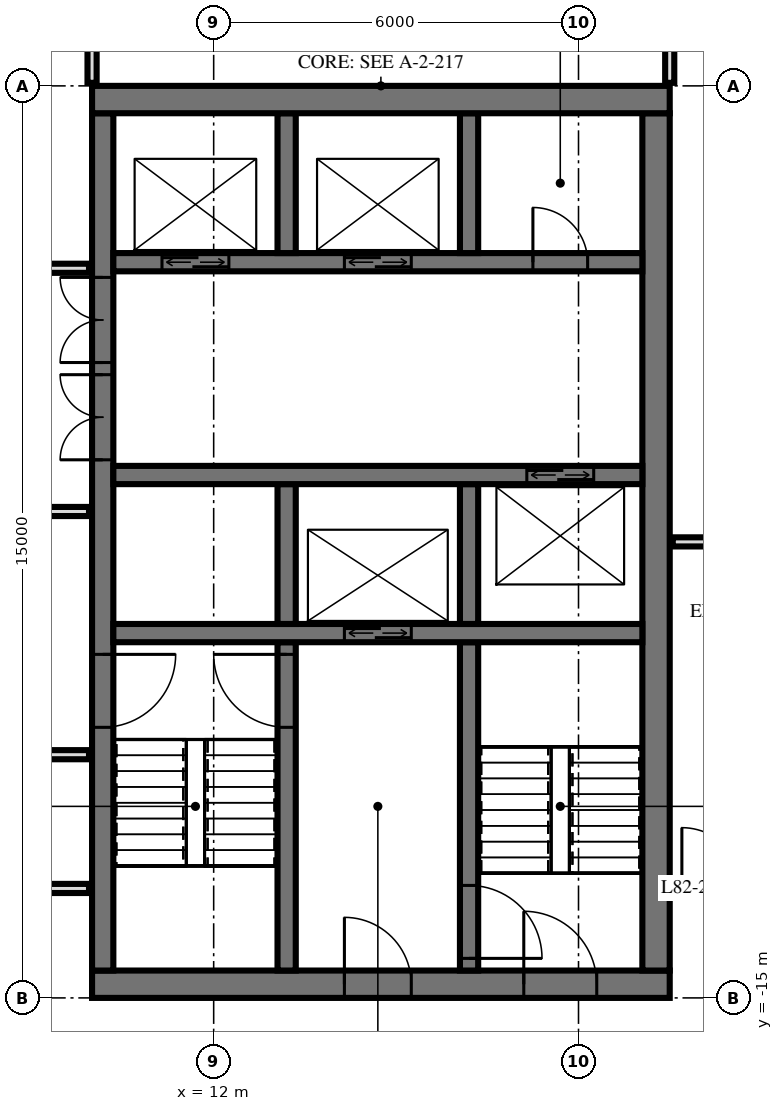
"""IFC4 building model, lengths in metres.
Left out: names, types, materials, properties, quantities, classifications, styles, units other than length and angle.
Written with IfcOpenShell. Run it as: python <this file> out.ifc"""

import sys

from ifc_helpers import new_model, si_unit, direction, frame, frame_2d, origin, place, context, subcontext, project, spatial, rectangle, extrude, element, fill, save


model = new_model("IFC4")
c1 = context("Model", 3, precision=1e-05, world=origin(), true_north=direction((0.0, 1.0)))
c2 = subcontext(c1, "Body", "Model", "MODEL_VIEW")
j1 = project(units=[si_unit("LENGTHUNIT", "METRE"), si_unit("PLANEANGLEUNIT", "RADIAN")], contexts=[c1])
p1 = place(None, origin())
s1 = spatial("IfcSite", under=j1, at=p1, CompositionType="ELEMENT")
p2 = place(p1, origin())
s2 = spatial("IfcBuilding", under=s1, at=p2, CompositionType="ELEMENT")
p3 = place(p2, frame((0.0, 0.0, 308.6)))
s3 = spatial("IfcBuildingStorey", under=s2, at=p3, CompositionType="ELEMENT", Elevation=308.6)
p4 = place(p3, frame((10.0, -0.225, 0.0), z_axis=(0.0, 0.0, 1.0), x_axis=(1.0, 0.0, 0.0)))
e1 = element("IfcWall", 1, at=p4, inside=s3, PredefinedType="SHEAR", context=c2, shape_type="SweptSolid", body=[
    extrude(rectangle(XDim=9.5, YDim=0.45, at=frame_2d((4.75, 0.0))), origin(), (0.0, 0.0, 1.0), 6.0),
])
p5 = place(p3, frame((10.0, -14.775, 0.0), z_axis=(0.0, 0.0, 1.0), x_axis=(1.0, 0.0, 0.0)))
e2 = element("IfcWall", 2, at=p5, inside=s3, PredefinedType="SHEAR", context=c2, shape_type="SweptSolid", body=[
    extrude(rectangle(XDim=9.5, YDim=0.45, at=frame_2d((4.75, 0.0))), origin(), (0.0, 0.0, 1.0), 6.0),
])
p6 = place(p5, frame((7.1, 0.0, 0.0)))
e3 = element("IfcOpeningElement", 3, at=p6, cuts=e2, PredefinedType="OPENING", context=c2, shape_type="SweptSolid", body=[
    extrude(rectangle(XDim=1.2, YDim=2.1, at=frame_2d((0.6, 1.05))), frame((0.0, 0.235, 0.0), z_axis=(0.0, -1.0, 0.0), x_axis=(1.0, 0.0, 0.0)), (0.0, 0.0, 1.0), 0.47),
])
p7 = place(p5, frame((4.15, 0.0, 0.0)))
e4 = element("IfcOpeningElement", 4, at=p7, cuts=e2, PredefinedType="OPENING", context=c2, shape_type="SweptSolid", body=[
    extrude(rectangle(XDim=1.1, YDim=2.1, at=frame_2d((0.55, 1.05))), frame((0.0, 0.235, 0.0), z_axis=(0.0, -1.0, 0.0), x_axis=(1.0, 0.0, 0.0)), (0.0, 0.0, 1.0), 0.47),
])
p8 = place(p3, frame((10.175, -14.55, 0.0), z_axis=(0.0, 0.0, 1.0), x_axis=(0.0, 1.0, 0.0)))
e5 = element("IfcWall", 5, at=p8, inside=s3, PredefinedType="SHEAR", context=c2, shape_type="SweptSolid", body=[
    extrude(rectangle(XDim=14.1, YDim=0.35, at=frame_2d((7.05, 0.0))), origin(), (0.0, 0.0, 1.0), 6.0),
])
p9 = place(p8, frame((8.4, 0.0, 0.0)))
e6 = element("IfcOpeningElement", 6, at=p9, cuts=e5, PredefinedType="OPENING", context=c2, shape_type="SweptSolid", body=[
    extrude(rectangle(XDim=1.4, YDim=2.4, at=frame_2d((0.7, 1.2))), frame((0.0, 0.185, 0.0), z_axis=(0.0, -1.0, 0.0), x_axis=(1.0, 0.0, 0.0)), (0.0, 0.0, 1.0), 0.37),
])
p10 = place(p8, frame((10.0, 0.0, 0.0)))
e7 = element("IfcOpeningElement", 7, at=p10, cuts=e5, PredefinedType="OPENING", context=c2, shape_type="SweptSolid", body=[
    extrude(rectangle(XDim=1.4, YDim=2.4, at=frame_2d((0.7, 1.2))), frame((0.0, 0.185, 0.0), z_axis=(0.0, -1.0, 0.0), x_axis=(1.0, 0.0, 0.0)), (0.0, 0.0, 1.0), 0.37),
])
p11 = place(p8, frame((4.0, 0.0, 0.0)))
e8 = element("IfcOpeningElement", 8, at=p11, cuts=e5, PredefinedType="OPENING", context=c2, shape_type="SweptSolid", body=[
    extrude(rectangle(XDim=1.2, YDim=2.1, at=frame_2d((0.6, 1.05))), frame((0.0, 0.185, 0.0), z_axis=(0.0, -1.0, 0.0), x_axis=(1.0, 0.0, 0.0)), (0.0, 0.0, 1.0), 0.37),
])
p12 = place(p3, frame((19.275, -14.55, 0.0), z_axis=(0.0, 0.0, 1.0), x_axis=(0.0, 1.0, 0.0)))
e9 = element("IfcWall", 9, at=p12, inside=s3, PredefinedType="SHEAR", context=c2, shape_type="SweptSolid", body=[
    extrude(rectangle(XDim=14.1, YDim=0.45, at=frame_2d((7.05, 0.0))), origin(), (0.0, 0.0, 1.0), 6.0),
])
p13 = place(p3, frame((10.35, -2.9, 0.0), z_axis=(0.0, 0.0, 1.0), x_axis=(1.0, 0.0, 0.0)))
e10 = element("IfcWall", 10, at=p13, inside=s3, PredefinedType="SHEAR", context=c2, shape_type="SweptSolid", body=[
    extrude(rectangle(XDim=8.7, YDim=0.3, at=frame_2d((4.35, 0.0))), origin(), (0.0, 0.0, 1.0), 6.0),
])
p14 = place(p13, frame((0.8, 0.0, 0.0)))
e11 = element("IfcOpeningElement", 11, at=p14, cuts=e10, PredefinedType="OPENING", context=c2, shape_type="SweptSolid", body=[
    extrude(rectangle(XDim=1.1, YDim=2.1, at=frame_2d((0.55, 1.05))), frame((0.0, 0.16, 0.0), z_axis=(0.0, -1.0, 0.0), x_axis=(1.0, 0.0, 0.0)), (0.0, 0.0, 1.0), 0.32),
])
p15 = place(p13, frame((3.8, 0.0, 0.0)))
e12 = element("IfcOpeningElement", 12, at=p15, cuts=e10, PredefinedType="OPENING", context=c2, shape_type="SweptSolid", body=[
    extrude(rectangle(XDim=1.1, YDim=2.1, at=frame_2d((0.55, 1.05))), frame((0.0, 0.16, 0.0), z_axis=(0.0, -1.0, 0.0), x_axis=(1.0, 0.0, 0.0)), (0.0, 0.0, 1.0), 0.32),
])
p16 = place(p13, frame((6.9, 0.0, 0.0)))
e13 = element("IfcOpeningElement", 13, at=p16, cuts=e10, PredefinedType="OPENING", context=c2, shape_type="SweptSolid", body=[
    extrude(rectangle(XDim=0.9, YDim=2.1, at=frame_2d((0.45, 1.05))), frame((0.0, 0.16, 0.0), z_axis=(0.0, -1.0, 0.0), x_axis=(1.0, 0.0, 0.0)), (0.0, 0.0, 1.0), 0.32),
])
p17 = place(p3, frame((10.35, -6.4, 0.0), z_axis=(0.0, 0.0, 1.0), x_axis=(1.0, 0.0, 0.0)))
e14 = element("IfcWall", 14, at=p17, inside=s3, PredefinedType="SHEAR", context=c2, shape_type="SweptSolid", body=[
    extrude(rectangle(XDim=8.7, YDim=0.3, at=frame_2d((4.35, 0.0))), origin(), (0.0, 0.0, 1.0), 6.0),
])
p18 = place(p17, frame((6.8, 0.0, 0.0)))
e15 = element("IfcOpeningElement", 15, at=p18, cuts=e14, PredefinedType="OPENING", context=c2, shape_type="SweptSolid", body=[
    extrude(rectangle(XDim=1.1, YDim=2.1, at=frame_2d((0.55, 1.05))), frame((0.0, 0.16, 0.0), z_axis=(0.0, -1.0, 0.0), x_axis=(1.0, 0.0, 0.0)), (0.0, 0.0, 1.0), 0.32),
])
p19 = place(p3, frame((10.35, -9.0, 0.0), z_axis=(0.0, 0.0, 1.0), x_axis=(1.0, 0.0, 0.0)))
e16 = element("IfcWall", 16, at=p19, inside=s3, PredefinedType="SHEAR", context=c2, shape_type="SweptSolid", body=[
    extrude(rectangle(XDim=8.7, YDim=0.3, at=frame_2d((4.35, 0.0))), origin(), (0.0, 0.0, 1.0), 6.0),
])
p20 = place(p19, frame((3.8, 0.0, 0.0)))
e17 = element("IfcOpeningElement", 17, at=p20, cuts=e16, PredefinedType="OPENING", context=c2, shape_type="SweptSolid", body=[
    extrude(rectangle(XDim=1.1, YDim=2.1, at=frame_2d((0.55, 1.05))), frame((0.0, 0.16, 0.0), z_axis=(0.0, -1.0, 0.0), x_axis=(1.0, 0.0, 0.0)), (0.0, 0.0, 1.0), 0.32),
])
for number, where, z_axis, x_axis in (
    (18, (13.2, -2.75, 0.0), (0.0, 0.0, 1.0), (0.0, 1.0, 0.0)),
    (19, (13.2, -8.85, 0.0), (0.0, 0.0, 1.0), (0.0, 1.0, 0.0)),
):
    element("IfcWall", number, at=place(p3, frame(where, z_axis=z_axis, x_axis=x_axis)), inside=s3, PredefinedType="SHEAR", context=c2, shape_type="SweptSolid", body=[
        extrude(rectangle(XDim=2.3, YDim=0.3, at=frame_2d((1.15, 0.0))), origin(), (0.0, 0.0, 1.0), 6.0),
    ])
p21 = place(p3, frame((13.2, -14.55, 0.0), z_axis=(0.0, 0.0, 1.0), x_axis=(0.0, 1.0, 0.0)))
e20 = element("IfcWall", 20, at=p21, inside=s3, PredefinedType="SHEAR", context=c2, shape_type="SweptSolid", body=[
    extrude(rectangle(XDim=5.4, YDim=0.3, at=frame_2d((2.7, 0.0))), origin(), (0.0, 0.0, 1.0), 6.0),
])
p22 = place(p21, frame((4.0, 0.0, 0.0)))
e21 = element("IfcOpeningElement", 21, at=p22, cuts=e20, PredefinedType="OPENING", context=c2, shape_type="SweptSolid", body=[
    extrude(rectangle(XDim=1.2, YDim=2.1, at=frame_2d((0.6, 1.05))), frame((0.0, 0.16, 0.0), z_axis=(0.0, -1.0, 0.0), x_axis=(1.0, 0.0, 0.0)), (0.0, 0.0, 1.0), 0.32),
])
for number, where, z_axis, x_axis in (
    (22, (16.2, -2.75, 0.0), (0.0, 0.0, 1.0), (0.0, 1.0, 0.0)),
    (23, (16.2, -8.85, 0.0), (0.0, 0.0, 1.0), (0.0, 1.0, 0.0)),
):
    element("IfcWall", number, at=place(p3, frame(where, z_axis=z_axis, x_axis=x_axis)), inside=s3, PredefinedType="SHEAR", context=c2, shape_type="SweptSolid", body=[
        extrude(rectangle(XDim=2.3, YDim=0.3, at=frame_2d((1.15, 0.0))), origin(), (0.0, 0.0, 1.0), 6.0),
    ])
p23 = place(p3, frame((16.2, -14.55, 0.0), z_axis=(0.0, 0.0, 1.0), x_axis=(0.0, 1.0, 0.0)))
e24 = element("IfcWall", 24, at=p23, inside=s3, PredefinedType="SHEAR", context=c2, shape_type="SweptSolid", body=[
    extrude(rectangle(XDim=5.4, YDim=0.3, at=frame_2d((2.7, 0.0))), origin(), (0.0, 0.0, 1.0), 6.0),
])
p24 = place(p23, frame((0.2, 0.0, 0.0)))
e25 = element("IfcOpeningElement", 25, at=p24, cuts=e24, PredefinedType="OPENING", context=c2, shape_type="SweptSolid", body=[
    extrude(rectangle(XDim=1.2, YDim=2.1, at=frame_2d((0.6, 1.05))), frame((0.0, 0.16, 0.0), z_axis=(0.0, -1.0, 0.0), x_axis=(1.0, 0.0, 0.0)), (0.0, 0.0, 1.0), 0.32),
])
p25 = place(p3, frame((19.5, 0.05, 0.0), z_axis=(0.0, 0.0, 1.0), x_axis=(0.0, 1.0, 0.0)))
e26 = element("IfcWall", 26, at=p25, inside=s3, PredefinedType="PARTITIONING", context=c2, shape_type="SweptSolid", body=[
    extrude(rectangle(XDim=4.403, YDim=0.15, at=frame_2d((2.202, 0.0))), origin(), (0.0, 0.0, 1.0), 5.7),
])
p26 = place(p3, frame((10.0, 0.05, 0.0), z_axis=(0.0, 0.0, 1.0), x_axis=(0.0, 1.0, 0.0)))
e27 = element("IfcWall", 27, at=p26, inside=s3, PredefinedType="PARTITIONING", context=c2, shape_type="SweptSolid", body=[
    extrude(rectangle(XDim=4.62, YDim=0.15, at=frame_2d((2.31, 0.0))), origin(), (0.0, 0.0, 1.0), 5.7),
])
p27 = place(p3, frame((-9.95, -13.2, 0.0), z_axis=(0.0, 0.0, 1.0), x_axis=(1.0, 0.0, 0.0)))
e28 = element("IfcWall", 28, at=p27, inside=s3, PredefinedType="PARTITIONING", context=c2, shape_type="SweptSolid", body=[
    extrude(rectangle(XDim=19.9, YDim=0.15, at=frame_2d((9.95, 0.0))), origin(), (0.0, 0.0, 1.0), 5.7),
])
p28 = place(p27, frame((7.0, 0.0, 0.0)))
e29 = element("IfcOpeningElement", 29, at=p28, cuts=e28, PredefinedType="OPENING", context=c2, shape_type="SweptSolid", body=[
    extrude(rectangle(XDim=1.0, YDim=2.1, at=frame_2d((0.5, 1.05))), frame((0.0, 0.085, 0.0), z_axis=(0.0, -1.0, 0.0), x_axis=(1.0, 0.0, 0.0)), (0.0, 0.0, 1.0), 0.17),
])
p29 = place(p3, frame((19.55, -13.2, 0.0), z_axis=(0.0, 0.0, 1.0), x_axis=(1.0, 0.0, 0.0)))
e30 = element("IfcWall", 30, at=p29, inside=s3, PredefinedType="PARTITIONING", context=c2, shape_type="SweptSolid", body=[
    extrude(rectangle(XDim=3.187, YDim=0.15, at=frame_2d((1.593, 0.0))), origin(), (0.0, 0.0, 1.0), 5.7),
])
p30 = place(p29, frame((0.15, 0.0, 0.0)))
e31 = element("IfcOpeningElement", 31, at=p30, cuts=e30, PredefinedType="OPENING", context=c2, shape_type="SweptSolid", body=[
    extrude(rectangle(XDim=1.0, YDim=2.1, at=frame_2d((0.5, 1.05))), frame((0.0, 0.085, 0.0), z_axis=(0.0, -1.0, 0.0), x_axis=(1.0, 0.0, 0.0)), (0.0, 0.0, 1.0), 0.17),
])
p31 = place(p3, frame((-9.95, -11.0, 0.0), z_axis=(0.0, 0.0, 1.0), x_axis=(1.0, 0.0, 0.0)))
e32 = element("IfcWall", 32, at=p31, inside=s3, PredefinedType="PARTITIONING", context=c2, shape_type="SweptSolid", body=[
    extrude(rectangle(XDim=19.9, YDim=0.15, at=frame_2d((9.95, 0.0))), origin(), (0.0, 0.0, 1.0), 5.7),
])
p32 = place(p31, frame((9.45, 0.0, 0.0)))
e33 = element("IfcOpeningElement", 33, at=p32, cuts=e32, PredefinedType="OPENING", context=c2, shape_type="SweptSolid", body=[
    extrude(rectangle(XDim=1.0, YDim=2.1, at=frame_2d((0.5, 1.05))), frame((0.0, 0.085, 0.0), z_axis=(0.0, -1.0, 0.0), x_axis=(1.0, 0.0, 0.0)), (0.0, 0.0, 1.0), 0.17),
])
p33 = place(p31, frame((15.45, 0.0, 0.0)))
e34 = element("IfcOpeningElement", 34, at=p33, cuts=e32, PredefinedType="OPENING", context=c2, shape_type="SweptSolid", body=[
    extrude(rectangle(XDim=1.0, YDim=2.1, at=frame_2d((0.5, 1.05))), frame((0.0, 0.085, 0.0), z_axis=(0.0, -1.0, 0.0), x_axis=(1.0, 0.0, 0.0)), (0.0, 0.0, 1.0), 0.17),
])
p34 = place(p3, frame((19.55, -7.5, 0.0), z_axis=(0.0, 0.0, 1.0), x_axis=(1.0, 0.0, 0.0)))
e35 = element("IfcWall", 35, at=p34, inside=s3, PredefinedType="PARTITIONING", context=c2, shape_type="SweptSolid", body=[
    extrude(rectangle(XDim=2.569, YDim=0.15, at=frame_2d((1.285, 0.0))), origin(), (0.0, 0.0, 1.0), 5.7),
])
p35 = place(p34, frame((0.901, 0.0, 0.0)))
e36 = element("IfcOpeningElement", 36, at=p35, cuts=e35, PredefinedType="OPENING", context=c2, shape_type="SweptSolid", body=[
    extrude(rectangle(XDim=0.9, YDim=2.1, at=frame_2d((0.45, 1.05))), frame((0.0, 0.085, 0.0), z_axis=(0.0, -1.0, 0.0), x_axis=(1.0, 0.0, 0.0)), (0.0, 0.0, 1.0), 0.17),
])
p36 = place(p3, frame((-9.95, -7.0, 0.0), z_axis=(0.0, 0.0, 1.0), x_axis=(1.0, 0.0, 0.0)))
e37 = element("IfcWall", 37, at=p36, inside=s3, PredefinedType="PARTITIONING", context=c2, shape_type="SweptSolid", body=[
    extrude(rectangle(XDim=19.9, YDim=0.15, at=frame_2d((9.95, 0.0))), origin(), (0.0, 0.0, 1.0), 5.7),
])
p37 = place(p36, frame((9.45, 0.0, 0.0)))
e38 = element("IfcOpeningElement", 38, at=p37, cuts=e37, PredefinedType="OPENING", context=c2, shape_type="SweptSolid", body=[
    extrude(rectangle(XDim=1.0, YDim=2.1, at=frame_2d((0.5, 1.05))), frame((0.0, 0.085, 0.0), z_axis=(0.0, -1.0, 0.0), x_axis=(1.0, 0.0, 0.0)), (0.0, 0.0, 1.0), 0.17),
])
p38 = place(p36, frame((2.0, 0.0, 0.0)))
e39 = element("IfcOpeningElement", 39, at=p38, cuts=e37, PredefinedType="OPENING", context=c2, shape_type="SweptSolid", body=[
    extrude(rectangle(XDim=1.0, YDim=2.1, at=frame_2d((0.5, 1.05))), frame((0.0, 0.085, 0.0), z_axis=(0.0, -1.0, 0.0), x_axis=(1.0, 0.0, 0.0)), (0.0, 0.0, 1.0), 0.17),
])
p39 = place(p3, frame((-9.95, -3.0, 0.0), z_axis=(0.0, 0.0, 1.0), x_axis=(1.0, 0.0, 0.0)))
e40 = element("IfcWall", 40, at=p39, inside=s3, PredefinedType="PARTITIONING", context=c2, shape_type="SweptSolid", body=[
    extrude(rectangle(XDim=19.9, YDim=0.15, at=frame_2d((9.95, 0.0))), origin(), (0.0, 0.0, 1.0), 5.7),
])
p40 = place(p39, frame((0.95, 0.0, 0.0)))
e41 = element("IfcOpeningElement", 41, at=p40, cuts=e40, PredefinedType="OPENING", context=c2, shape_type="SweptSolid", body=[
    extrude(rectangle(XDim=1.0, YDim=2.1, at=frame_2d((0.5, 1.05))), frame((0.0, 0.085, 0.0), z_axis=(0.0, -1.0, 0.0), x_axis=(1.0, 0.0, 0.0)), (0.0, 0.0, 1.0), 0.17),
])
p41 = place(p39, frame((3.7, 0.0, 0.0)))
e42 = element("IfcOpeningElement", 42, at=p41, cuts=e40, PredefinedType="OPENING", context=c2, shape_type="SweptSolid", body=[
    extrude(rectangle(XDim=1.0, YDim=2.1, at=frame_2d((0.5, 1.05))), frame((0.0, 0.085, 0.0), z_axis=(0.0, -1.0, 0.0), x_axis=(1.0, 0.0, 0.0)), (0.0, 0.0, 1.0), 0.17),
])
p42 = place(p39, frame((7.0, 0.0, 0.0)))
e43 = element("IfcOpeningElement", 43, at=p42, cuts=e40, PredefinedType="OPENING", context=c2, shape_type="SweptSolid", body=[
    extrude(rectangle(XDim=1.0, YDim=2.1, at=frame_2d((0.5, 1.05))), frame((0.0, 0.085, 0.0), z_axis=(0.0, -1.0, 0.0), x_axis=(1.0, 0.0, 0.0)), (0.0, 0.0, 1.0), 0.17),
])
p43 = place(p39, frame((16.9, 0.0, 0.0)))
e44 = element("IfcOpeningElement", 44, at=p43, cuts=e40, PredefinedType="OPENING", context=c2, shape_type="SweptSolid", body=[
    extrude(rectangle(XDim=1.0, YDim=2.1, at=frame_2d((0.5, 1.05))), frame((0.0, 0.085, 0.0), z_axis=(0.0, -1.0, 0.0), x_axis=(1.0, 0.0, 0.0)), (0.0, 0.0, 1.0), 0.17),
])
p44 = place(p14, origin())
e45 = element("IfcDoor", 45, at=p44, inside=s3, OperationType="DOUBLE_DOOR_SLIDING", PredefinedType="USERDEFINED", context=c2, shape_type="SweptSolid", body=[
    extrude(rectangle(XDim=1.1, YDim=2.1, at=frame_2d((0.55, 1.05))), frame((0.0, 0.025, 0.0), z_axis=(0.0, -1.0, 0.0), x_axis=(1.0, 0.0, 0.0)), (0.0, 0.0, 1.0), 0.05),
])
fill(e11, e45)
p45 = place(p15, origin())
e46 = element("IfcDoor", 46, at=p45, inside=s3, OperationType="DOUBLE_DOOR_SLIDING", PredefinedType="USERDEFINED", context=c2, shape_type="SweptSolid", body=[
    extrude(rectangle(XDim=1.1, YDim=2.1, at=frame_2d((0.55, 1.05))), frame((0.0, 0.025, 0.0), z_axis=(0.0, -1.0, 0.0), x_axis=(1.0, 0.0, 0.0)), (0.0, 0.0, 1.0), 0.05),
])
fill(e12, e46)
p46 = place(p20, origin())
e47 = element("IfcDoor", 47, at=p46, inside=s3, OperationType="DOUBLE_DOOR_SLIDING", PredefinedType="USERDEFINED", context=c2, shape_type="SweptSolid", body=[
    extrude(rectangle(XDim=1.1, YDim=2.1, at=frame_2d((0.55, 1.05))), frame((0.0, 0.025, 0.0), z_axis=(0.0, -1.0, 0.0), x_axis=(1.0, 0.0, 0.0)), (0.0, 0.0, 1.0), 0.05),
])
fill(e17, e47)
p47 = place(p18, origin())
e48 = element("IfcDoor", 48, at=p47, inside=s3, OperationType="DOUBLE_DOOR_SLIDING", PredefinedType="USERDEFINED", context=c2, shape_type="SweptSolid", body=[
    extrude(rectangle(XDim=1.1, YDim=2.1, at=frame_2d((0.55, 1.05))), frame((0.0, 0.025, 0.0), z_axis=(0.0, -1.0, 0.0), x_axis=(1.0, 0.0, 0.0)), (0.0, 0.0, 1.0), 0.05),
])
fill(e15, e48)
p48 = place(p9, origin())
e49 = element("IfcDoor", 49, at=p48, inside=s3, OperationType="DOUBLE_DOOR_SINGLE_SWING", PredefinedType="DOOR", context=c2, shape_type="SweptSolid", body=[
    extrude(rectangle(XDim=1.4, YDim=2.4, at=frame_2d((0.7, 1.2))), frame((0.0, 0.025, 0.0), z_axis=(0.0, -1.0, 0.0), x_axis=(1.0, 0.0, 0.0)), (0.0, 0.0, 1.0), 0.05),
])
fill(e6, e49)
p49 = place(p10, origin())
e50 = element("IfcDoor", 50, at=p49, inside=s3, OperationType="DOUBLE_DOOR_SINGLE_SWING", PredefinedType="DOOR", context=c2, shape_type="SweptSolid", body=[
    extrude(rectangle(XDim=1.4, YDim=2.4, at=frame_2d((0.7, 1.2))), frame((0.0, 0.025, 0.0), z_axis=(0.0, -1.0, 0.0), x_axis=(1.0, 0.0, 0.0)), (0.0, 0.0, 1.0), 0.05),
])
fill(e7, e50)
p50 = place(p11, frame((0.6, 0.0, 0.0), z_axis=(0.0, 0.0, 1.0), x_axis=(-1.0, 0.0, 0.0)))
e51 = element("IfcDoor", 51, at=p50, inside=s3, OperationType="SINGLE_SWING_RIGHT", PredefinedType="DOOR", context=c2, shape_type="SweptSolid", body=[
    extrude(rectangle(XDim=1.2, YDim=2.1, at=frame_2d((0.0, 1.05))), frame((0.0, -0.025, 0.0), z_axis=(0.0, 1.0, 0.0), x_axis=(-1.0, 0.0, 0.0)), (0.0, 0.0, 1.0), 0.05),
])
fill(e8, e51)
p51 = place(p6, origin())
e52 = element("IfcDoor", 52, at=p51, inside=s3, OperationType="SINGLE_SWING_RIGHT", PredefinedType="DOOR", context=c2, shape_type="SweptSolid", body=[
    extrude(rectangle(XDim=1.2, YDim=2.1, at=frame_2d((0.6, 1.05))), frame((0.0, 0.025, 0.0), z_axis=(0.0, -1.0, 0.0), x_axis=(1.0, 0.0, 0.0)), (0.0, 0.0, 1.0), 0.05),
])
fill(e3, e52)
p52 = place(p7, origin())
e53 = element("IfcDoor", 53, at=p52, inside=s3, OperationType="SINGLE_SWING_RIGHT", PredefinedType="DOOR", context=c2, shape_type="SweptSolid", body=[
    extrude(rectangle(XDim=1.1, YDim=2.1, at=frame_2d((0.55, 1.05))), frame((0.0, 0.025, 0.0), z_axis=(0.0, -1.0, 0.0), x_axis=(1.0, 0.0, 0.0)), (0.0, 0.0, 1.0), 0.05),
])
fill(e4, e53)
p53 = place(p16, origin())
e54 = element("IfcDoor", 54, at=p53, inside=s3, OperationType="SINGLE_SWING_RIGHT", PredefinedType="DOOR", context=c2, shape_type="SweptSolid", body=[
    extrude(rectangle(XDim=0.9, YDim=2.1, at=frame_2d((0.45, 1.05))), frame((0.0, 0.025, 0.0), z_axis=(0.0, -1.0, 0.0), x_axis=(1.0, 0.0, 0.0)), (0.0, 0.0, 1.0), 0.05),
])
fill(e13, e54)
p54 = place(p22, origin())
e55 = element("IfcDoor", 55, at=p54, inside=s3, OperationType="SINGLE_SWING_LEFT", PredefinedType="DOOR", context=c2, shape_type="SweptSolid", body=[
    extrude(rectangle(XDim=1.2, YDim=2.1, at=frame_2d((0.6, 1.05))), frame((0.0, 0.025, 0.0), z_axis=(0.0, -1.0, 0.0), x_axis=(1.0, 0.0, 0.0)), (0.0, 0.0, 1.0), 0.05),
])
fill(e21, e55)
p55 = place(p24, frame((0.6, 0.0, 0.0), z_axis=(0.0, 0.0, 1.0), x_axis=(-1.0, 0.0, 0.0)))
e56 = element("IfcDoor", 56, at=p55, inside=s3, OperationType="SINGLE_SWING_LEFT", PredefinedType="DOOR", context=c2, shape_type="SweptSolid", body=[
    extrude(rectangle(XDim=1.2, YDim=2.1, at=frame_2d((0.0, 1.05))), frame((0.0, -0.025, 0.0), z_axis=(0.0, 1.0, 0.0), x_axis=(-1.0, 0.0, 0.0)), (0.0, 0.0, 1.0), 0.05),
])
fill(e25, e56)
p56 = place(p30, origin())
e57 = element("IfcDoor", 57, at=p56, inside=s3, OperationType="SINGLE_SWING_RIGHT", PredefinedType="DOOR", context=c2, shape_type="SweptSolid", body=[
    extrude(rectangle(XDim=1.0, YDim=2.1, at=frame_2d((0.5, 1.05))), frame((0.0, 0.025, 0.0), z_axis=(0.0, -1.0, 0.0), x_axis=(1.0, 0.0, 0.0)), (0.0, 0.0, 1.0), 0.05),
])
fill(e31, e57)
save(model, sys.argv[1])
